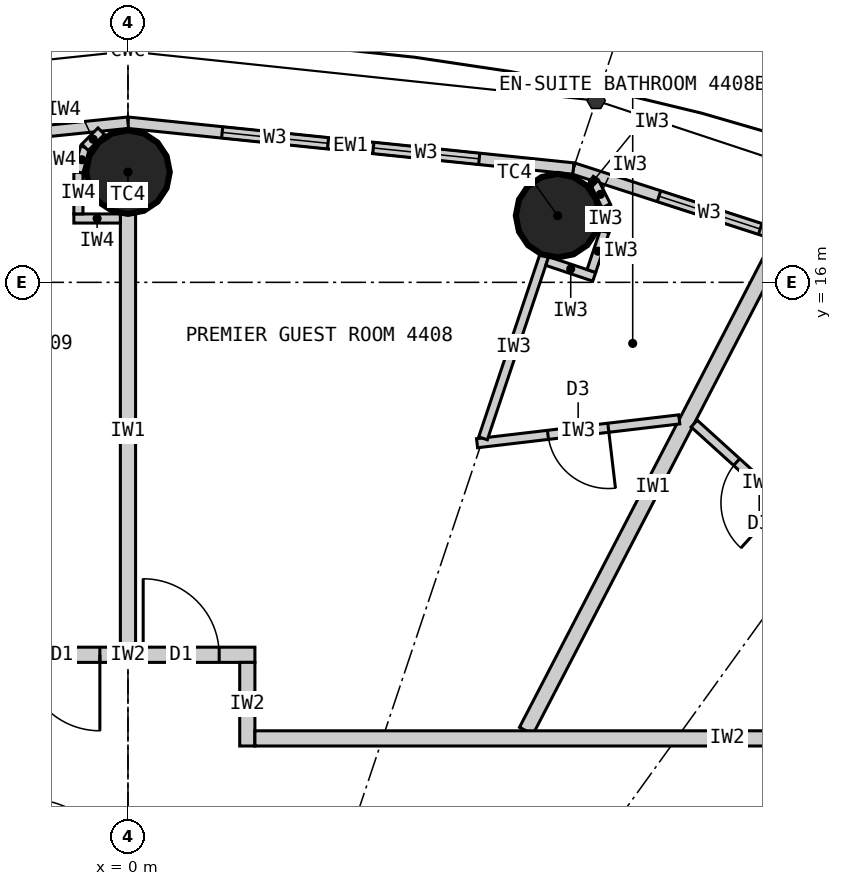
"""IFC4 building model, lengths in metres.
Left out: names, types, materials, properties, quantities, classifications, styles, units other than length and angle.
Written with IfcOpenShell. Run it as: python <this file> out.ifc"""

import sys

from ifc_helpers import new_model, si_unit, direction, frame, frame_2d, origin, origin_2d, place, context, subcontext, project, spatial, rectangle, circle, extrude, element, fill, save


model = new_model("IFC4")
c1 = context("Model", 3, precision=1e-05, world=origin(), true_north=direction((0.0, 1.0)))
c2 = subcontext(c1, "Body", "Model", "MODEL_VIEW")
j1 = project(units=[si_unit("LENGTHUNIT", "METRE"), si_unit("PLANEANGLEUNIT", "RADIAN")], contexts=[c1])
p1 = place(None, origin())
s1 = spatial("IfcSite", under=j1, at=p1, CompositionType="ELEMENT")
p2 = place(p1, origin())
s2 = spatial("IfcBuilding", under=s1, at=p2, CompositionType="ELEMENT")
p3 = place(p2, frame((0.0, 0.0, 166.5)))
s3 = spatial("IfcBuildingStorey", under=s2, at=p3, CompositionType="ELEMENT", Elevation=166.5)
for number, where, z_axis, x_axis in (
    (1, (5.653, 16.877, 0.0), (0.0, 0.0, 1.0), (1.0, 0.0, 0.0)),
    (2, (0.0, 17.45, 0.0), (0.0, 0.0, 1.0), (1.0, 0.0, 0.0)),
):
    element("IfcColumn", number, at=place(p3, frame(where, z_axis=z_axis, x_axis=x_axis)), inside=s3, PredefinedType="COLUMN", context=c2, shape_type="SweptSolid", body=[
        extrude(circle(Radius=0.55, at=origin_2d()), origin(), (0.0, 0.0, 1.0), 3.3),
    ])
p4 = place(p3, frame((11.346, 15.722, 0.0), z_axis=(0.0, 0.0, 1.0), x_axis=(-0.951432482129, 0.307857486429, 0.0)))
e3 = element("IfcWall", 3, at=p4, inside=s3, PredefinedType="ELEMENTEDWALL", context=c2, shape_type="SweptSolid", body=[
    extrude(rectangle(XDim=5.766, YDim=0.15, at=frame_2d((2.883, 0.0))), origin(), (0.0, 0.0, 1.0), 3.12),
])
p5 = place(p4, frame((1.183, 0.0, 0.9)))
e4 = element("IfcOpeningElement", 4, at=p5, cuts=e3, PredefinedType="OPENING", context=c2, shape_type="SweptSolid", body=[
    extrude(rectangle(XDim=1.4, YDim=1.9, at=frame_2d((0.7, 0.95))), frame((0.0, 0.085, 0.0), z_axis=(0.0, -1.0, 0.0), x_axis=(1.0, 0.0, 0.0)), (0.0, 0.0, 1.0), 0.17),
])
p6 = place(p4, frame((3.183, 0.0, 0.9)))
e5 = element("IfcOpeningElement", 5, at=p6, cuts=e3, PredefinedType="OPENING", context=c2, shape_type="SweptSolid", body=[
    extrude(rectangle(XDim=1.4, YDim=1.9, at=frame_2d((0.7, 0.95))), frame((0.0, 0.085, 0.0), z_axis=(0.0, -1.0, 0.0), x_axis=(1.0, 0.0, 0.0)), (0.0, 0.0, 1.0), 0.17),
])
p7 = place(p3, frame((5.86, 17.497, 0.0), z_axis=(0.0, 0.0, 1.0), x_axis=(-0.994751738032, 0.102318032045, 0.0)))
e6 = element("IfcWall", 6, at=p7, inside=s3, PredefinedType="ELEMENTEDWALL", context=c2, shape_type="SweptSolid", body=[
    extrude(rectangle(XDim=5.891, YDim=0.15, at=frame_2d((2.946, 0.0))), origin(), (0.0, 0.0, 1.0), 3.12),
])
p8 = place(p7, frame((1.246, 0.0, 0.9)))
e7 = element("IfcOpeningElement", 7, at=p8, cuts=e6, PredefinedType="OPENING", context=c2, shape_type="SweptSolid", body=[
    extrude(rectangle(XDim=1.4, YDim=1.9, at=frame_2d((0.7, 0.95))), frame((0.0, 0.085, 0.0), z_axis=(0.0, -1.0, 0.0), x_axis=(1.0, 0.0, 0.0)), (0.0, 0.0, 1.0), 0.17),
])
p9 = place(p7, frame((3.246, 0.0, 0.9)))
e8 = element("IfcOpeningElement", 8, at=p9, cuts=e6, PredefinedType="OPENING", context=c2, shape_type="SweptSolid", body=[
    extrude(rectangle(XDim=1.4, YDim=1.9, at=frame_2d((0.7, 0.95))), frame((0.0, 0.085, 0.0), z_axis=(0.0, -1.0, 0.0), x_axis=(1.0, 0.0, 0.0)), (0.0, 0.0, 1.0), 0.17),
])
p10 = place(p3, frame((0.0, 18.1, 0.0), z_axis=(0.0, 0.0, 1.0), x_axis=(-0.994751738032, -0.102318032045, 0.0)))
e9 = element("IfcWall", 9, at=p10, inside=s3, PredefinedType="ELEMENTEDWALL", context=c2, shape_type="SweptSolid", body=[
    extrude(rectangle(XDim=5.891, YDim=0.15, at=frame_2d((2.946, 0.0))), origin(), (0.0, 0.0, 1.0), 3.12),
])
p11 = place(p10, frame((1.246, 0.0, 0.9)))
e10 = element("IfcOpeningElement", 10, at=p11, cuts=e9, PredefinedType="OPENING", context=c2, shape_type="SweptSolid", body=[
    extrude(rectangle(XDim=1.4, YDim=1.9, at=frame_2d((0.7, 0.95))), frame((0.0, 0.085, 0.0), z_axis=(0.0, -1.0, 0.0), x_axis=(1.0, 0.0, 0.0)), (0.0, 0.0, 1.0), 0.17),
])
p12 = place(p10, frame((3.246, 0.0, 0.9)))
e11 = element("IfcOpeningElement", 11, at=p12, cuts=e9, PredefinedType="OPENING", context=c2, shape_type="SweptSolid", body=[
    extrude(rectangle(XDim=1.4, YDim=1.9, at=frame_2d((0.7, 0.95))), frame((0.0, 0.085, 0.0), z_axis=(0.0, -1.0, 0.0), x_axis=(1.0, 0.0, 0.0)), (0.0, 0.0, 1.0), 0.17),
])
p13 = place(p3, frame((5.24, 10.1, 0.0), z_axis=(0.0, 0.0, 1.0), x_axis=(0.460532965373, 0.887642601391, 0.0)))
e12 = element("IfcWall", 12, at=p13, inside=s3, PredefinedType="PARTITIONING", context=c2, shape_type="SweptSolid", body=[
    extrude(rectangle(XDim=7.231, YDim=0.2, at=frame_2d((3.616, 0.0))), origin(), (0.0, 0.0, 1.0), 3.12),
])
p14 = place(p3, frame((0.0, 11.2, 0.0), z_axis=(0.0, 0.0, 1.0), x_axis=(0.0, 1.0, 0.0)))
e13 = element("IfcWall", 13, at=p14, inside=s3, PredefinedType="PARTITIONING", context=c2, shape_type="SweptSolid", body=[
    extrude(rectangle(XDim=5.7, YDim=0.2, at=frame_2d((2.85, 0.0))), origin(), (0.0, 0.0, 1.0), 2.42),
])
p15 = place(p3, frame((-1.67, 11.1, 0.0), z_axis=(0.0, 0.0, 1.0), x_axis=(1.0, 0.0, 0.0)))
e14 = element("IfcWall", 14, at=p15, inside=s3, PredefinedType="PARTITIONING", context=c2, shape_type="SweptSolid", body=[
    extrude(rectangle(XDim=3.34, YDim=0.2, at=frame_2d((1.67, 0.0))), origin(), (0.0, 0.0, 1.0), 3.12),
])
p16 = place(p15, frame((1.87, 0.0, 0.0)))
e15 = element("IfcOpeningElement", 15, at=p16, cuts=e14, PredefinedType="OPENING", context=c2, shape_type="SweptSolid", body=[
    extrude(rectangle(XDim=1.0, YDim=2.2, at=frame_2d((0.5, 1.1))), frame((0.0, 0.11, 0.0), z_axis=(0.0, -1.0, 0.0), x_axis=(1.0, 0.0, 0.0)), (0.0, 0.0, 1.0), 0.22),
])
p17 = place(p15, frame((0.3, 0.0, 0.0)))
e16 = element("IfcOpeningElement", 16, at=p17, cuts=e14, PredefinedType="OPENING", context=c2, shape_type="SweptSolid", body=[
    extrude(rectangle(XDim=1.0, YDim=2.2, at=frame_2d((0.5, 1.1))), frame((0.0, 0.11, 0.0), z_axis=(0.0, -1.0, 0.0), x_axis=(1.0, 0.0, 0.0)), (0.0, 0.0, 1.0), 0.22),
])
p18 = place(p3, frame((1.57, 9.9, 0.0), z_axis=(0.0, 0.0, 1.0), x_axis=(0.0, 1.0, 0.0)))
e17 = element("IfcWall", 17, at=p18, inside=s3, PredefinedType="PARTITIONING", context=c2, shape_type="SweptSolid", body=[
    extrude(rectangle(XDim=1.1, YDim=0.2, at=frame_2d((0.55, 0.0))), origin(), (0.0, 0.0, 1.0), 3.12),
])
p19 = place(p3, frame((7.45, 14.142, 0.0), z_axis=(0.0, 0.0, 1.0), x_axis=(0.74113984586, -0.671350675041, 0.0)))
e18 = element("IfcWall", 18, at=p19, inside=s3, PredefinedType="PARTITIONING", context=c2, shape_type="SweptSolid", body=[
    extrude(rectangle(XDim=2.309, YDim=0.12, at=frame_2d((1.154, 0.0))), origin(), (0.0, 0.0, 1.0), 3.12),
])
p20 = place(p19, frame((0.754, 0.0, 0.0)))
e19 = element("IfcOpeningElement", 19, at=p20, cuts=e18, PredefinedType="OPENING", context=c2, shape_type="SweptSolid", body=[
    extrude(rectangle(XDim=0.8, YDim=2.1, at=frame_2d((0.4, 1.05))), frame((0.0, 0.07, 0.0), z_axis=(0.0, -1.0, 0.0), x_axis=(1.0, 0.0, 0.0)), (0.0, 0.0, 1.0), 0.14),
])
p21 = place(p3, frame((7.253, 14.197, 0.0), z_axis=(0.0, 0.0, 1.0), x_axis=(-0.993128188393, -0.117031625725, 0.0)))
e20 = element("IfcWall", 20, at=p21, inside=s3, PredefinedType="PARTITIONING", context=c2, shape_type="SweptSolid", body=[
    extrude(rectangle(XDim=2.678, YDim=0.12, at=frame_2d((1.339, 0.0))), origin(), (0.0, 0.0, 1.0), 3.12),
])
p22 = place(p21, frame((0.939, 0.0, 0.0)))
e21 = element("IfcOpeningElement", 21, at=p22, cuts=e20, PredefinedType="OPENING", context=c2, shape_type="SweptSolid", body=[
    extrude(rectangle(XDim=0.8, YDim=2.1, at=frame_2d((0.4, 1.05))), frame((0.0, 0.07, 0.0), z_axis=(0.0, -1.0, 0.0), x_axis=(1.0, 0.0, 0.0)), (0.0, 0.0, 1.0), 0.14),
])
p23 = place(p3, frame((4.671, 13.948, 0.0), z_axis=(0.0, 0.0, 1.0), x_axis=(0.317669167093, 0.948201613729, 0.0)))
e22 = element("IfcWall", 22, at=p23, inside=s3, PredefinedType="PARTITIONING", context=c2, shape_type="SweptSolid", body=[
    extrude(rectangle(XDim=2.54, YDim=0.12, at=frame_2d((1.27, 0.0))), origin(), (0.0, 0.0, 1.0), 2.42),
])
p24 = place(p3, frame((5.516, 16.28, 0.0), z_axis=(0.0, 0.0, 1.0), x_axis=(0.948157944392, -0.317799484717, 0.0)))
e23 = element("IfcWall", 23, at=p24, inside=s3, PredefinedType="PARTITIONING", context=c2, shape_type="SweptSolid", body=[
    extrude(rectangle(XDim=0.652, YDim=0.12, at=frame_2d((0.326, 0.0))), origin(), (0.0, 0.0, 1.0), 3.12),
])
p25 = place(p3, frame((6.097, 16.149, 0.0), z_axis=(0.0, 0.0, 1.0), x_axis=(0.317292604854, 0.948327687514, 0.0)))
e24 = element("IfcWall", 24, at=p25, inside=s3, PredefinedType="PARTITIONING", context=c2, shape_type="SweptSolid", body=[
    extrude(rectangle(XDim=0.55, YDim=0.12, at=frame_2d((0.275, 0.0))), origin(), (0.0, 0.0, 1.0), 3.12),
])
for number, where, z_axis, x_axis in (
    (25, (6.271, 16.67, 0.0), (0.0, 0.0, 1.0), (0.061, 0.998, 0.0)),
    (26, (6.292, 17.007, 0.0), (0.0, 0.0, 1.0), (-0.445, 0.895, 0.0)),
):
    element("IfcWall", number, at=place(p3, frame(where, z_axis=z_axis, x_axis=x_axis)), inside=s3, PredefinedType="PARTITIONING", context=c2, shape_type="SweptSolid", body=[
        extrude(rectangle(XDim=0.338, YDim=0.12, at=frame_2d((0.169, 0.0))), origin(), (0.0, 0.0, 1.0), 3.12),
    ])
p26 = place(p3, frame((6.142, 17.31, 0.0), z_axis=(0.0, 0.0, 1.0), x_axis=(-0.835039693181, 0.550189704386, 0.0)))
e27 = element("IfcWall", 27, at=p26, inside=s3, PredefinedType="PARTITIONING", context=c2, shape_type="SweptSolid", body=[
    extrude(rectangle(XDim=0.062, YDim=0.12, at=frame_2d((0.031, 0.0))), origin(), (0.0, 0.0, 1.0), 3.12),
])
p27 = place(p3, frame((1.67, 10.0, 0.0), z_axis=(0.0, 0.0, 1.0), x_axis=(1.0, 0.0, 0.0)))
e28 = element("IfcWall", 28, at=p27, inside=s3, PredefinedType="PARTITIONING", context=c2, shape_type="SweptSolid", body=[
    extrude(rectangle(XDim=12.43, YDim=0.2, at=frame_2d((6.215, 0.0))), origin(), (0.0, 0.0, 1.0), 3.12),
])
p28 = place(p27, frame((9.655, 0.0, 0.0)))
e29 = element("IfcOpeningElement", 29, at=p28, cuts=e28, PredefinedType="OPENING", context=c2, shape_type="SweptSolid", body=[
    extrude(rectangle(XDim=1.0, YDim=2.2, at=frame_2d((0.5, 1.1))), frame((0.0, 0.11, 0.0), z_axis=(0.0, -1.0, 0.0), x_axis=(1.0, 0.0, 0.0)), (0.0, 0.0, 1.0), 0.22),
])
p29 = place(p3, frame((-0.1, 16.84, 0.0), z_axis=(0.0, 0.0, 1.0), x_axis=(-1.0, 0.0, 0.0)))
e30 = element("IfcWall", 30, at=p29, inside=s3, PredefinedType="PARTITIONING", context=c2, shape_type="SweptSolid", body=[
    extrude(rectangle(XDim=0.612, YDim=0.12, at=frame_2d((0.306, 0.0))), origin(), (0.0, 0.0, 1.0), 3.12),
])
p30 = place(p3, frame((-0.652, 16.9, 0.0), z_axis=(0.0, 0.0, 1.0), x_axis=(0.0, 1.0, 0.0)))
e31 = element("IfcWall", 31, at=p30, inside=s3, PredefinedType="PARTITIONING", context=c2, shape_type="SweptSolid", body=[
    extrude(rectangle(XDim=0.55, YDim=0.12, at=frame_2d((0.275, 0.0))), origin(), (0.0, 0.0, 1.0), 3.12),
])
p31 = place(p3, frame((-0.652, 17.45, 0.0), z_axis=(0.0, 0.0, 1.0), x_axis=(0.258832454679, 0.965922233104, 0.0)))
e32 = element("IfcWall", 32, at=p31, inside=s3, PredefinedType="PARTITIONING", context=c2, shape_type="SweptSolid", body=[
    extrude(rectangle(XDim=0.338, YDim=0.12, at=frame_2d((0.169, 0.0))), origin(), (0.0, 0.0, 1.0), 3.12),
])
p32 = place(p3, frame((-0.565, 17.776, 0.0), z_axis=(0.0, 0.0, 1.0), x_axis=(0.707106781187, 0.707106781187, 0.0)))
e33 = element("IfcWall", 33, at=p32, inside=s3, PredefinedType="PARTITIONING", context=c2, shape_type="SweptSolid", body=[
    extrude(rectangle(XDim=0.301, YDim=0.12, at=frame_2d((0.15, 0.0))), origin(), (0.0, 0.0, 1.0), 3.12),
])
p33 = place(p6, origin())
e34 = element("IfcWindow", 34, at=p33, inside=s3, PartitioningType="SINGLE_PANEL", PredefinedType="WINDOW", context=c2, shape_type="SweptSolid", body=[
    extrude(rectangle(XDim=1.4, YDim=1.9, at=frame_2d((0.7, 0.95))), frame((0.0, 0.03, 0.0), z_axis=(0.0, -1.0, 0.0), x_axis=(1.0, 0.0, 0.0)), (0.0, 0.0, 1.0), 0.06),
])
fill(e5, e34)
p34 = place(p8, origin())
e35 = element("IfcWindow", 35, at=p34, inside=s3, PartitioningType="SINGLE_PANEL", PredefinedType="WINDOW", context=c2, shape_type="SweptSolid", body=[
    extrude(rectangle(XDim=1.4, YDim=1.9, at=frame_2d((0.7, 0.95))), frame((0.0, 0.03, 0.0), z_axis=(0.0, -1.0, 0.0), x_axis=(1.0, 0.0, 0.0)), (0.0, 0.0, 1.0), 0.06),
])
fill(e7, e35)
p35 = place(p9, origin())
e36 = element("IfcWindow", 36, at=p35, inside=s3, PartitioningType="SINGLE_PANEL", PredefinedType="WINDOW", context=c2, shape_type="SweptSolid", body=[
    extrude(rectangle(XDim=1.4, YDim=1.9, at=frame_2d((0.7, 0.95))), frame((0.0, 0.03, 0.0), z_axis=(0.0, -1.0, 0.0), x_axis=(1.0, 0.0, 0.0)), (0.0, 0.0, 1.0), 0.06),
])
fill(e8, e36)
p36 = place(p20, origin())
e37 = element("IfcDoor", 37, at=p36, inside=s3, OperationType="SINGLE_SWING_RIGHT", PredefinedType="DOOR", context=c2, shape_type="SweptSolid", body=[
    extrude(rectangle(XDim=0.8, YDim=2.1, at=frame_2d((0.4, 1.05))), frame((0.0, 0.025, 0.0), z_axis=(0.0, -1.0, 0.0), x_axis=(1.0, 0.0, 0.0)), (0.0, 0.0, 1.0), 0.05),
])
fill(e19, e37)
p37 = place(p22, origin())
e38 = element("IfcDoor", 38, at=p37, inside=s3, OperationType="SINGLE_SWING_LEFT", PredefinedType="DOOR", context=c2, shape_type="SweptSolid", body=[
    extrude(rectangle(XDim=0.8, YDim=2.1, at=frame_2d((0.4, 1.05))), frame((0.0, 0.025, 0.0), z_axis=(0.0, -1.0, 0.0), x_axis=(1.0, 0.0, 0.0)), (0.0, 0.0, 1.0), 0.05),
])
fill(e21, e38)
p38 = place(p16, origin())
e39 = element("IfcDoor", 39, at=p38, inside=s3, OperationType="SINGLE_SWING_LEFT", PredefinedType="DOOR", context=c2, shape_type="SweptSolid", body=[
    extrude(rectangle(XDim=1.0, YDim=2.2, at=frame_2d((0.5, 1.1))), frame((0.0, 0.025, 0.0), z_axis=(0.0, -1.0, 0.0), x_axis=(1.0, 0.0, 0.0)), (0.0, 0.0, 1.0), 0.05),
])
fill(e15, e39)
p39 = place(p17, origin())
e40 = element("IfcDoor", 40, at=p39, inside=s3, OperationType="SINGLE_SWING_RIGHT", PredefinedType="DOOR", context=c2, shape_type="SweptSolid", body=[
    extrude(rectangle(XDim=1.0, YDim=2.2, at=frame_2d((0.5, 1.1))), frame((0.0, 0.025, 0.0), z_axis=(0.0, -1.0, 0.0), x_axis=(1.0, 0.0, 0.0)), (0.0, 0.0, 1.0), 0.05),
])
fill(e16, e40)
save(model, sys.argv[1])
